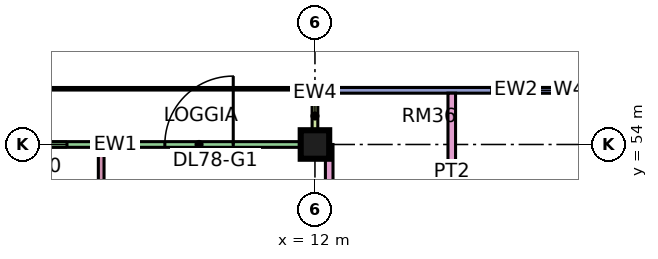
"""IFC4 building model, lengths in metres.
Left out: names, types, materials, properties, quantities, classifications, styles, units other than length and angle.
Written with IfcOpenShell. Run it as: python <this file> out.ifc"""

import sys

from ifc_helpers import new_model, si_unit, direction, frame, frame_2d, origin, origin_2d, place, context, subcontext, project, spatial, rectangle, extrude, element, fill, save


model = new_model("IFC4")
c1 = context("Model", 3, precision=1e-05, world=origin(), true_north=direction((0.0, 1.0)))
c2 = subcontext(c1, "Body", "Model", "MODEL_VIEW")
j1 = project(units=[si_unit("LENGTHUNIT", "METRE"), si_unit("PLANEANGLEUNIT", "RADIAN")], contexts=[c1])
p1 = place(None, origin())
s1 = spatial("IfcSite", under=j1, at=p1, CompositionType="ELEMENT")
p2 = place(p1, origin())
s2 = spatial("IfcBuilding", under=s1, at=p2, CompositionType="ELEMENT")
p3 = place(p2, frame((0.0, 0.0, 338.9)))
s3 = spatial("IfcBuildingStorey", under=s2, at=p3, CompositionType="ELEMENT", Elevation=338.9)
p4 = place(p3, frame((12.0, 54.0, 0.0), z_axis=(0.0, 0.0, 1.0), x_axis=(1.0, 0.0, 0.0)))
e1 = element("IfcColumn", 1, at=p4, inside=s3, PredefinedType="COLUMN", context=c2, shape_type="SweptSolid", body=[
    extrude(rectangle(XDim=0.75, YDim=0.75, at=origin_2d()), origin(), (0.0, 0.0, 1.0), 3.75),
])
p5 = place(p3, frame((22.5, 55.425, 0.0), z_axis=(0.0, 0.0, 1.0), x_axis=(-1.0, 0.0, 0.0)))
e2 = element("IfcWall", 2, at=p5, inside=s3, PredefinedType="SOLIDWALL", context=c2, shape_type="SweptSolid", body=[
    extrude(rectangle(XDim=10.425, YDim=0.15, at=frame_2d((5.212, 0.0))), origin(), (0.0, 0.0, 1.0), 3.35),
])
p6 = place(p5, frame((1.05, 0.0, 0.45)))
e3 = element("IfcOpeningElement", 3, at=p6, cuts=e2, PredefinedType="OPENING", context=c2, shape_type="SweptSolid", body=[
    extrude(rectangle(XDim=4.8, YDim=2.4, at=frame_2d((2.4, 1.2))), frame((0.0, 0.085, 0.0), z_axis=(0.0, -1.0, 0.0), x_axis=(1.0, 0.0, 0.0)), (0.0, 0.0, 1.0), 0.17),
])
p7 = place(p3, frame((11.925, 54.0, 0.0), z_axis=(0.0, 0.0, 1.0), x_axis=(-1.0, 0.0, 0.0)))
e4 = element("IfcWall", 4, at=p7, inside=s3, PredefinedType="SOLIDWALL", context=c2, shape_type="SweptSolid", body=[
    extrude(rectangle(XDim=10.35, YDim=0.15, at=frame_2d((5.175, 0.0))), origin(), (0.0, 0.0, 1.0), 3.35),
])
p8 = place(p7, frame((2.075, 0.0, 0.0)))
e5 = element("IfcOpeningElement", 5, at=p8, cuts=e4, PredefinedType="OPENING", context=c2, shape_type="SweptSolid", body=[
    extrude(rectangle(XDim=1.8, YDim=2.4, at=frame_2d((0.9, 1.2))), frame((0.0, 0.085, 0.0), z_axis=(0.0, -1.0, 0.0), x_axis=(1.0, 0.0, 0.0)), (0.0, 0.0, 1.0), 0.17),
])
p9 = place(p7, frame((6.45, 0.0, 0.45)))
e6 = element("IfcOpeningElement", 6, at=p9, cuts=e4, PredefinedType="OPENING", context=c2, shape_type="SweptSolid", body=[
    extrude(rectangle(XDim=3.0, YDim=2.4, at=frame_2d((1.5, 1.2))), frame((0.0, 0.085, 0.0), z_axis=(0.0, -1.0, 0.0), x_axis=(1.0, 0.0, 0.0)), (0.0, 0.0, 1.0), 0.17),
])
p10 = place(p3, frame((12.0, 55.5, 0.0), z_axis=(0.0, 0.0, 1.0), x_axis=(0.0, -1.0, 0.0)))
e7 = element("IfcWall", 7, at=p10, inside=s3, PredefinedType="SOLIDWALL", context=c2, shape_type="SweptSolid", body=[
    extrude(rectangle(XDim=1.5, YDim=0.15, at=frame_2d((0.75, 0.0))), origin(), (0.0, 0.0, 1.0), 3.35),
])
p11 = place(p3, frame((6.375, 41.95, 0.0), z_axis=(0.0, 0.0, 1.0), x_axis=(0.0, 1.0, 0.0)))
e8 = element("IfcWall", 8, at=p11, inside=s3, PredefinedType="PARTITIONING", context=c2, shape_type="SweptSolid", body=[
    extrude(rectangle(XDim=11.976, YDim=0.15, at=frame_2d((5.988, 0.0))), origin(), (0.0, 0.0, 1.0), 3.35),
])
p12 = place(p11, frame((4.1, 0.0, 0.0)))
e9 = element("IfcOpeningElement", 9, at=p12, cuts=e8, PredefinedType="OPENING", context=c2, shape_type="SweptSolid", body=[
    extrude(rectangle(XDim=0.9, YDim=2.1, at=frame_2d((0.45, 1.05))), frame((0.0, 0.085, 0.0), z_axis=(0.0, -1.0, 0.0), x_axis=(1.0, 0.0, 0.0)), (0.0, 0.0, 1.0), 0.17),
])
p13 = place(p11, frame((10.1, 0.0, 0.0)))
e10 = element("IfcOpeningElement", 10, at=p13, cuts=e8, PredefinedType="OPENING", context=c2, shape_type="SweptSolid", body=[
    extrude(rectangle(XDim=0.9, YDim=2.1, at=frame_2d((0.45, 1.05))), frame((0.0, 0.085, 0.0), z_axis=(0.0, -1.0, 0.0), x_axis=(1.0, 0.0, 0.0)), (0.0, 0.0, 1.0), 0.17),
])
p14 = place(p11, frame((1.1, 0.0, 0.0)))
e11 = element("IfcOpeningElement", 11, at=p14, cuts=e8, PredefinedType="OPENING", context=c2, shape_type="SweptSolid", body=[
    extrude(rectangle(XDim=0.9, YDim=2.1, at=frame_2d((0.45, 1.05))), frame((0.0, 0.085, 0.0), z_axis=(0.0, -1.0, 0.0), x_axis=(1.0, 0.0, 0.0)), (0.0, 0.0, 1.0), 0.17),
])
p15 = place(p3, frame((12.375, 20.0, 0.0), z_axis=(0.0, 0.0, 1.0), x_axis=(0.0, 1.0, 0.0)))
e12 = element("IfcWall", 12, at=p15, inside=s3, PredefinedType="PARTITIONING", context=c2, shape_type="SweptSolid", body=[
    extrude(rectangle(XDim=34.0, YDim=0.2, at=frame_2d((17.0, 0.0))), origin(), (0.0, 0.0, 1.0), 3.35),
])
p16 = place(p15, frame((31.8, 0.0, 0.0)))
e13 = element("IfcOpeningElement", 13, at=p16, cuts=e12, PredefinedType="OPENING", context=c2, shape_type="SweptSolid", body=[
    extrude(rectangle(XDim=1.0, YDim=2.1, at=frame_2d((0.5, 1.05))), frame((0.0, 0.11, 0.0), z_axis=(0.0, -1.0, 0.0), x_axis=(1.0, 0.0, 0.0)), (0.0, 0.0, 1.0), 0.22),
])
p17 = place(p15, frame((0.6, 0.0, 0.0)))
e14 = element("IfcOpeningElement", 14, at=p17, cuts=e12, PredefinedType="OPENING", context=c2, shape_type="SweptSolid", body=[
    extrude(rectangle(XDim=1.2, YDim=2.1, at=frame_2d((0.6, 1.05))), frame((0.0, 0.11, 0.0), z_axis=(0.0, -1.0, 0.0), x_axis=(1.0, 0.0, 0.0)), (0.0, 0.0, 1.0), 0.22),
])
p18 = place(p15, frame((14.1, 0.0, 0.0)))
e15 = element("IfcOpeningElement", 15, at=p18, cuts=e12, PredefinedType="OPENING", context=c2, shape_type="SweptSolid", body=[
    extrude(rectangle(XDim=1.0, YDim=2.1, at=frame_2d((0.5, 1.05))), frame((0.0, 0.11, 0.0), z_axis=(0.0, -1.0, 0.0), x_axis=(1.0, 0.0, 0.0)), (0.0, 0.0, 1.0), 0.22),
])
p19 = place(p3, frame((15.6, 51.225, 0.0), z_axis=(0.0, 0.0, 1.0), x_axis=(0.0, 1.0, 0.0)))
e16 = element("IfcWall", 16, at=p19, inside=s3, PredefinedType="PARTITIONING", context=c2, shape_type="SweptSolid", body=[
    extrude(rectangle(XDim=4.125, YDim=0.2, at=frame_2d((2.062, 0.0))), origin(), (0.0, 0.0, 1.0), 3.35),
])
p20 = place(p6, origin())
e17 = element("IfcWindow", 17, at=p20, inside=s3, PartitioningType="SINGLE_PANEL", PredefinedType="WINDOW", context=c2, shape_type="SweptSolid", body=[
    extrude(rectangle(XDim=4.8, YDim=2.4, at=frame_2d((2.4, 1.2))), frame((0.0, 0.03, 0.0), z_axis=(0.0, -1.0, 0.0), x_axis=(1.0, 0.0, 0.0)), (0.0, 0.0, 1.0), 0.06),
])
fill(e3, e17)
p21 = place(p8, frame((1.8, 0.0, 0.0), z_axis=(0.0, 0.0, 1.0), x_axis=(-1.0, 0.0, 0.0)))
e18 = element("IfcDoor", 18, at=p21, inside=s3, OperationType="DOUBLE_DOOR_SINGLE_SWING", PredefinedType="DOOR", context=c2, shape_type="SweptSolid", body=[
    extrude(rectangle(XDim=1.8, YDim=2.4, at=frame_2d((0.9, 1.2))), frame((0.0, 0.025, 0.0), z_axis=(0.0, -1.0, 0.0), x_axis=(1.0, 0.0, 0.0)), (0.0, 0.0, 1.0), 0.05),
])
fill(e5, e18)
p22 = place(p9, origin())
e19 = element("IfcWindow", 19, at=p22, inside=s3, PartitioningType="SINGLE_PANEL", PredefinedType="WINDOW", context=c2, shape_type="SweptSolid", body=[
    extrude(rectangle(XDim=3.0, YDim=2.4, at=frame_2d((1.5, 1.2))), frame((0.0, 0.03, 0.0), z_axis=(0.0, -1.0, 0.0), x_axis=(1.0, 0.0, 0.0)), (0.0, 0.0, 1.0), 0.06),
])
fill(e6, e19)
save(model, sys.argv[1])
